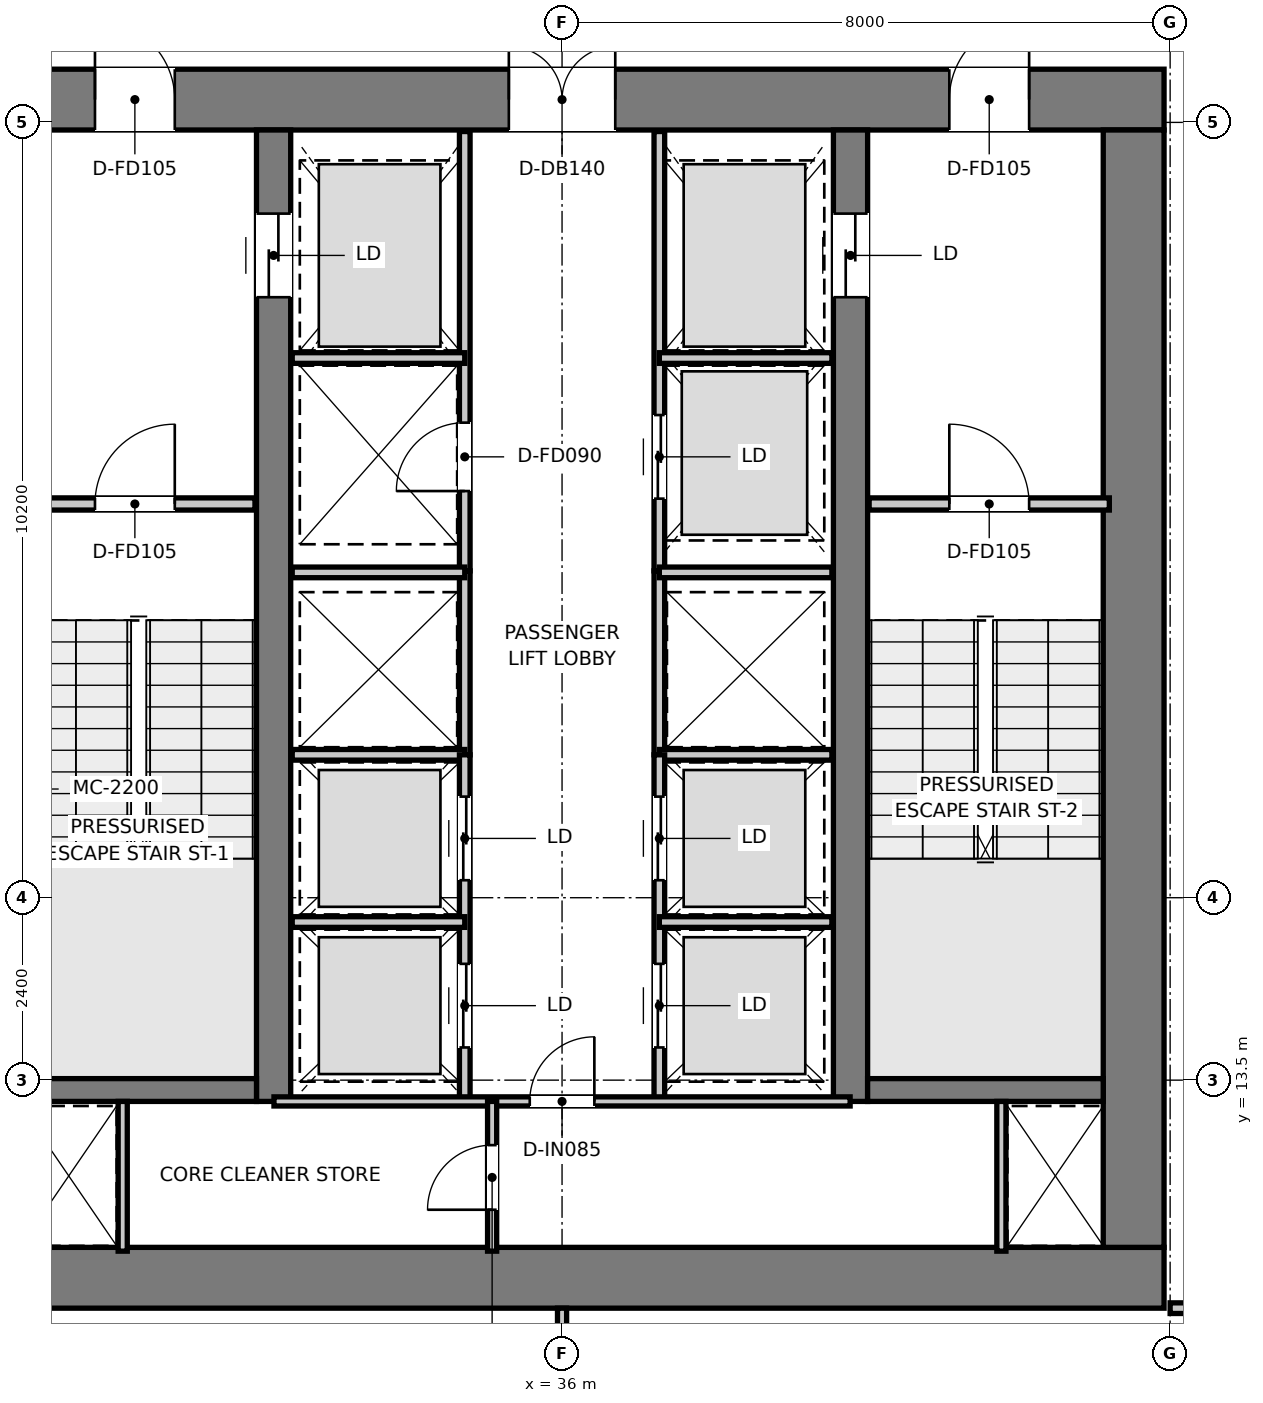
"""IFC4 building model, lengths in metres.
Left out: names, types, materials, properties, quantities, classifications, styles, units other than length and angle.
Written with IfcOpenShell. Run it as: python <this file> out.ifc"""

import sys

from ifc_helpers import new_model, si_unit, direction, frame, frame_2d, origin, place, context, subcontext, project, spatial, rectangle, extrude, element, fill, save


model = new_model("IFC4")
c1 = context("Model", 3, precision=1e-05, world=origin(), true_north=direction((0.0, 1.0)))
c2 = subcontext(c1, "Body", "Model", "MODEL_VIEW")
j1 = project(units=[si_unit("LENGTHUNIT", "METRE"), si_unit("PLANEANGLEUNIT", "RADIAN")], contexts=[c1])
p1 = place(None, origin())
s1 = spatial("IfcSite", under=j1, at=p1, CompositionType="ELEMENT")
p2 = place(p1, origin())
s2 = spatial("IfcBuilding", under=s1, at=p2, CompositionType="ELEMENT")
p3 = place(p2, frame((0.0, 0.0, 68.45)))
s3 = spatial("IfcBuildingStorey", under=s2, at=p3, CompositionType="ELEMENT", Elevation=68.45)
p4 = place(p3, frame((28.08, 10.9, 0.0), z_axis=(0.0, 0.0, 1.0), x_axis=(1.0, 0.0, 0.0)))
e1 = element("IfcWall", 1, at=p4, inside=s3, PredefinedType="SHEAR", context=c2, shape_type="SweptSolid", body=[
    extrude(rectangle(XDim=15.84, YDim=0.8, at=frame_2d((7.92, 0.0))), origin(), (0.0, 0.0, 1.0), 3.95),
])
p5 = place(p3, frame((28.08, 26.4, 0.0), z_axis=(0.0, 0.0, 1.0), x_axis=(1.0, 0.0, 0.0)))
e2 = element("IfcWall", 2, at=p5, inside=s3, PredefinedType="SHEAR", context=c2, shape_type="SweptSolid", body=[
    extrude(rectangle(XDim=15.84, YDim=0.8, at=frame_2d((7.92, 0.0))), origin(), (0.0, 0.0, 1.0), 3.95),
])
p6 = place(p5, frame((7.22, 0.0, 0.0)))
e3 = element("IfcOpeningElement", 3, at=p6, cuts=e2, PredefinedType="OPENING", context=c2, shape_type="SweptSolid", body=[
    extrude(rectangle(XDim=1.4, YDim=2.2, at=frame_2d((0.7, 1.1))), frame((0.0, 0.41, 0.0), z_axis=(0.0, -1.0, 0.0), x_axis=(1.0, 0.0, 0.0)), (0.0, 0.0, 1.0), 0.82),
])
p7 = place(p5, frame((1.775, 0.0, 0.0)))
e4 = element("IfcOpeningElement", 4, at=p7, cuts=e2, PredefinedType="OPENING", context=c2, shape_type="SweptSolid", body=[
    extrude(rectangle(XDim=1.05, YDim=2.1, at=frame_2d((0.525, 1.05))), frame((0.0, 0.41, 0.0), z_axis=(0.0, -1.0, 0.0), x_axis=(1.0, 0.0, 0.0)), (0.0, 0.0, 1.0), 0.82),
])
p8 = place(p5, frame((13.015, 0.0, 0.0)))
e5 = element("IfcOpeningElement", 5, at=p8, cuts=e2, PredefinedType="OPENING", context=c2, shape_type="SweptSolid", body=[
    extrude(rectangle(XDim=1.05, YDim=2.1, at=frame_2d((0.525, 1.05))), frame((0.0, 0.41, 0.0), z_axis=(0.0, -1.0, 0.0), x_axis=(1.0, 0.0, 0.0)), (0.0, 0.0, 1.0), 0.82),
])
p9 = place(p3, frame((43.52, 11.3, 0.0), z_axis=(0.0, 0.0, 1.0), x_axis=(0.0, 1.0, 0.0)))
e6 = element("IfcWall", 6, at=p9, inside=s3, PredefinedType="SHEAR", context=c2, shape_type="SweptSolid", body=[
    extrude(rectangle(XDim=14.7, YDim=0.8, at=frame_2d((7.35, 0.0))), origin(), (0.0, 0.0, 1.0), 3.95),
])
p10 = place(p3, frame((32.205, 13.22, 0.0), z_axis=(0.0, 0.0, 1.0), x_axis=(0.0, 1.0, 0.0)))
e7 = element("IfcWall", 7, at=p10, inside=s3, PredefinedType="SHEAR", context=c2, shape_type="SweptSolid", body=[
    extrude(rectangle(XDim=12.78, YDim=0.45, at=frame_2d((6.39, 0.0))), origin(), (0.0, 0.0, 1.0), 3.95),
])
p11 = place(p10, frame((10.58, 0.0, 0.0)))
e8 = element("IfcOpeningElement", 8, at=p11, cuts=e7, PredefinedType="OPENING", context=c2, shape_type="SweptSolid", body=[
    extrude(rectangle(XDim=1.1, YDim=2.15, at=frame_2d((0.55, 1.075))), frame((0.0, 0.235, 0.0), z_axis=(0.0, -1.0, 0.0), x_axis=(1.0, 0.0, 0.0)), (0.0, 0.0, 1.0), 0.47),
])
p12 = place(p3, frame((39.795, 13.22, 0.0), z_axis=(0.0, 0.0, 1.0), x_axis=(0.0, 1.0, 0.0)))
e9 = element("IfcWall", 9, at=p12, inside=s3, PredefinedType="SHEAR", context=c2, shape_type="SweptSolid", body=[
    extrude(rectangle(XDim=12.78, YDim=0.45, at=frame_2d((6.39, 0.0))), origin(), (0.0, 0.0, 1.0), 3.95),
])
p13 = place(p12, frame((10.58, 0.0, 0.0)))
e10 = element("IfcOpeningElement", 10, at=p13, cuts=e9, PredefinedType="OPENING", context=c2, shape_type="SweptSolid", body=[
    extrude(rectangle(XDim=1.1, YDim=2.15, at=frame_2d((0.55, 1.075))), frame((0.0, 0.235, 0.0), z_axis=(0.0, -1.0, 0.0), x_axis=(1.0, 0.0, 0.0)), (0.0, 0.0, 1.0), 0.47),
])
for number, where, z_axis, x_axis in (
    (11, (28.88, 13.37, 0.0), (0.0, 0.0, 1.0), (1.0, 0.0, 0.0)),
    (12, (40.02, 13.37, 0.0), (0.0, 0.0, 1.0), (1.0, 0.0, 0.0)),
):
    element("IfcWall", number, at=place(p3, frame(where, z_axis=z_axis, x_axis=x_axis)), inside=s3, PredefinedType="SHEAR", context=c2, shape_type="SweptSolid", body=[
        extrude(rectangle(XDim=3.1, YDim=0.3, at=frame_2d((1.55, 0.0))), origin(), (0.0, 0.0, 1.0), 3.95),
    ])
p14 = place(p3, frame((28.8, 21.08, 0.0), z_axis=(0.0, 0.0, 1.0), x_axis=(1.0, 0.0, 0.0)))
e13 = element("IfcWall", 13, at=p14, inside=s3, PredefinedType="PARTITIONING", context=c2, shape_type="SweptSolid", body=[
    extrude(rectangle(XDim=3.16, YDim=0.16, at=frame_2d((1.58, 0.0))), origin(), (0.0, 0.0, 1.0), 3.67),
])
p15 = place(p14, frame((1.055, 0.0, 0.0)))
e14 = element("IfcOpeningElement", 14, at=p15, cuts=e13, PredefinedType="OPENING", context=c2, shape_type="SweptSolid", body=[
    extrude(rectangle(XDim=1.05, YDim=2.1, at=frame_2d((0.525, 1.05))), frame((0.0, 0.09, 0.0), z_axis=(0.0, -1.0, 0.0), x_axis=(1.0, 0.0, 0.0)), (0.0, 0.0, 1.0), 0.18),
])
p16 = place(p3, frame((40.04, 21.08, 0.0), z_axis=(0.0, 0.0, 1.0), x_axis=(1.0, 0.0, 0.0)))
e15 = element("IfcWall", 15, at=p16, inside=s3, PredefinedType="PARTITIONING", context=c2, shape_type="SweptSolid", body=[
    extrude(rectangle(XDim=3.16, YDim=0.16, at=frame_2d((1.58, 0.0))), origin(), (0.0, 0.0, 1.0), 3.67),
])
p17 = place(p16, frame((1.055, 0.0, 0.0)))
e16 = element("IfcOpeningElement", 16, at=p17, cuts=e15, PredefinedType="OPENING", context=c2, shape_type="SweptSolid", body=[
    extrude(rectangle(XDim=1.05, YDim=2.1, at=frame_2d((0.525, 1.05))), frame((0.0, 0.09, 0.0), z_axis=(0.0, -1.0, 0.0), x_axis=(1.0, 0.0, 0.0)), (0.0, 0.0, 1.0), 0.18),
])
p18 = place(p3, frame((34.72, 20.2, 0.0), z_axis=(0.0, 0.0, 1.0), x_axis=(0.0, 1.0, 0.0)))
e17 = element("IfcWall", 17, at=p18, inside=s3, PredefinedType="PARTITIONING", context=c2, shape_type="SweptSolid", body=[
    extrude(rectangle(XDim=5.78, YDim=0.14, at=frame_2d((2.89, 0.0))), origin(), (0.0, 0.0, 1.0), 2.47),
])
p19 = place(p18, frame((1.05, 0.0, 0.0)))
e18 = element("IfcOpeningElement", 18, at=p19, cuts=e17, PredefinedType="OPENING", context=c2, shape_type="SweptSolid", body=[
    extrude(rectangle(XDim=0.9, YDim=2.1, at=frame_2d((0.45, 1.05))), frame((0.0, 0.08, 0.0), z_axis=(0.0, -1.0, 0.0), x_axis=(1.0, 0.0, 0.0)), (0.0, 0.0, 1.0), 0.16),
])
p20 = place(p3, frame((37.28, 20.2, 0.0), z_axis=(0.0, 0.0, 1.0), x_axis=(0.0, 1.0, 0.0)))
e19 = element("IfcWall", 19, at=p20, inside=s3, PredefinedType="PARTITIONING", context=c2, shape_type="SweptSolid", body=[
    extrude(rectangle(XDim=5.78, YDim=0.14, at=frame_2d((2.89, 0.0))), origin(), (0.0, 0.0, 1.0), 2.47),
])
p21 = place(p20, frame((0.95, 0.0, 0.0)))
e20 = element("IfcOpeningElement", 20, at=p21, cuts=e19, PredefinedType="OPENING", context=c2, shape_type="SweptSolid", body=[
    extrude(rectangle(XDim=1.1, YDim=2.15, at=frame_2d((0.55, 1.075))), frame((0.0, 0.08, 0.0), z_axis=(0.0, -1.0, 0.0), x_axis=(1.0, 0.0, 0.0)), (0.0, 0.0, 1.0), 0.16),
])
for number, where, z_axis, x_axis in (
    (21, (32.45, 23.0, 0.0), (0.0, 0.0, 1.0), (1.0, 0.0, 0.0)),
    (22, (37.28, 23.0, 0.0), (0.0, 0.0, 1.0), (1.0, 0.0, 0.0)),
):
    element("IfcWall", number, at=place(p3, frame(where, z_axis=z_axis, x_axis=x_axis)), inside=s3, PredefinedType="PARTITIONING", context=c2, shape_type="SweptSolid", body=[
        extrude(rectangle(XDim=2.27, YDim=0.14, at=frame_2d((1.135, 0.0))), origin(), (0.0, 0.0, 1.0), 2.47),
    ])
for number, where, z_axis, x_axis in (
    (23, (34.72, 17.78, 0.0), (0.0, 0.0, 1.0), (0.0, 1.0, 0.0)),
    (24, (37.28, 17.78, 0.0), (0.0, 0.0, 1.0), (0.0, 1.0, 0.0)),
):
    element("IfcWall", number, at=place(p3, frame(where, z_axis=z_axis, x_axis=x_axis)), inside=s3, PredefinedType="PARTITIONING", context=c2, shape_type="SweptSolid", body=[
        extrude(rectangle(XDim=2.42, YDim=0.14, at=frame_2d((1.21, 0.0))), origin(), (0.0, 0.0, 1.0), 3.67),
    ])
for number, where, z_axis, x_axis in (
    (25, (32.45, 17.78, 0.0), (0.0, 0.0, 1.0), (1.0, 0.0, 0.0)),
    (26, (32.45, 20.18, 0.0), (0.0, 0.0, 1.0), (1.0, 0.0, 0.0)),
    (27, (37.28, 17.78, 0.0), (0.0, 0.0, 1.0), (1.0, 0.0, 0.0)),
    (28, (37.28, 20.18, 0.0), (0.0, 0.0, 1.0), (1.0, 0.0, 0.0)),
):
    element("IfcWall", number, at=place(p3, frame(where, z_axis=z_axis, x_axis=x_axis)), inside=s3, PredefinedType="PARTITIONING", context=c2, shape_type="SweptSolid", body=[
        extrude(rectangle(XDim=2.27, YDim=0.14, at=frame_2d((1.135, 0.0))), origin(), (0.0, 0.0, 1.0), 3.67),
    ])
p22 = place(p3, frame((34.72, 13.22, 0.0), z_axis=(0.0, 0.0, 1.0), x_axis=(0.0, 1.0, 0.0)))
e29 = element("IfcWall", 29, at=p22, inside=s3, PredefinedType="PARTITIONING", context=c2, shape_type="SweptSolid", body=[
    extrude(rectangle(XDim=4.56, YDim=0.14, at=frame_2d((2.28, 0.0))), origin(), (0.0, 0.0, 1.0), 3.67),
])
p23 = place(p22, frame((0.71, 0.0, 0.0)))
e30 = element("IfcOpeningElement", 30, at=p23, cuts=e29, PredefinedType="OPENING", context=c2, shape_type="SweptSolid", body=[
    extrude(rectangle(XDim=1.1, YDim=2.15, at=frame_2d((0.55, 1.075))), frame((0.0, 0.08, 0.0), z_axis=(0.0, -1.0, 0.0), x_axis=(1.0, 0.0, 0.0)), (0.0, 0.0, 1.0), 0.16),
])
p24 = place(p22, frame((2.91, 0.0, 0.0)))
e31 = element("IfcOpeningElement", 31, at=p24, cuts=e29, PredefinedType="OPENING", context=c2, shape_type="SweptSolid", body=[
    extrude(rectangle(XDim=1.1, YDim=2.15, at=frame_2d((0.55, 1.075))), frame((0.0, 0.08, 0.0), z_axis=(0.0, -1.0, 0.0), x_axis=(1.0, 0.0, 0.0)), (0.0, 0.0, 1.0), 0.16),
])
p25 = place(p3, frame((32.45, 15.58, 0.0), z_axis=(0.0, 0.0, 1.0), x_axis=(1.0, 0.0, 0.0)))
e32 = element("IfcWall", 32, at=p25, inside=s3, PredefinedType="PARTITIONING", context=c2, shape_type="SweptSolid", body=[
    extrude(rectangle(XDim=2.27, YDim=0.14, at=frame_2d((1.135, 0.0))), origin(), (0.0, 0.0, 1.0), 3.67),
])
p26 = place(p3, frame((37.28, 13.22, 0.0), z_axis=(0.0, 0.0, 1.0), x_axis=(0.0, 1.0, 0.0)))
e33 = element("IfcWall", 33, at=p26, inside=s3, PredefinedType="PARTITIONING", context=c2, shape_type="SweptSolid", body=[
    extrude(rectangle(XDim=4.56, YDim=0.14, at=frame_2d((2.28, 0.0))), origin(), (0.0, 0.0, 1.0), 3.67),
])
p27 = place(p26, frame((0.71, 0.0, 0.0)))
e34 = element("IfcOpeningElement", 34, at=p27, cuts=e33, PredefinedType="OPENING", context=c2, shape_type="SweptSolid", body=[
    extrude(rectangle(XDim=1.1, YDim=2.15, at=frame_2d((0.55, 1.075))), frame((0.0, 0.08, 0.0), z_axis=(0.0, -1.0, 0.0), x_axis=(1.0, 0.0, 0.0)), (0.0, 0.0, 1.0), 0.16),
])
p28 = place(p26, frame((2.91, 0.0, 0.0)))
e35 = element("IfcOpeningElement", 35, at=p28, cuts=e33, PredefinedType="OPENING", context=c2, shape_type="SweptSolid", body=[
    extrude(rectangle(XDim=1.1, YDim=2.15, at=frame_2d((0.55, 1.075))), frame((0.0, 0.08, 0.0), z_axis=(0.0, -1.0, 0.0), x_axis=(1.0, 0.0, 0.0)), (0.0, 0.0, 1.0), 0.16),
])
p29 = place(p3, frame((37.28, 15.58, 0.0), z_axis=(0.0, 0.0, 1.0), x_axis=(1.0, 0.0, 0.0)))
e36 = element("IfcWall", 36, at=p29, inside=s3, PredefinedType="PARTITIONING", context=c2, shape_type="SweptSolid", body=[
    extrude(rectangle(XDim=2.27, YDim=0.14, at=frame_2d((1.135, 0.0))), origin(), (0.0, 0.0, 1.0), 3.67),
])
for number, where, z_axis, x_axis in (
    (37, (30.22, 11.25, 0.0), (0.0, 0.0, 1.0), (0.0, 1.0, 0.0)),
    (38, (41.78, 11.25, 0.0), (0.0, 0.0, 1.0), (0.0, 1.0, 0.0)),
):
    element("IfcWall", number, at=place(p3, frame(where, z_axis=z_axis, x_axis=x_axis)), inside=s3, PredefinedType="PARTITIONING", context=c2, shape_type="SweptSolid", body=[
        extrude(rectangle(XDim=1.97, YDim=0.12, at=frame_2d((0.985, 0.0))), origin(), (0.0, 0.0, 1.0), 3.67),
    ])
p30 = place(p3, frame((32.21, 13.22, 0.0), z_axis=(0.0, 0.0, 1.0), x_axis=(1.0, 0.0, 0.0)))
e39 = element("IfcWall", 39, at=p30, inside=s3, PredefinedType="PARTITIONING", context=c2, shape_type="SweptSolid", body=[
    extrude(rectangle(XDim=7.58, YDim=0.12, at=frame_2d((3.79, 0.0))), origin(), (0.0, 0.0, 1.0), 3.67),
])
p31 = place(p30, frame((3.365, 0.0, 0.0)))
e40 = element("IfcOpeningElement", 40, at=p31, cuts=e39, PredefinedType="OPENING", context=c2, shape_type="SweptSolid", body=[
    extrude(rectangle(XDim=0.85, YDim=2.1, at=frame_2d((0.425, 1.05))), frame((0.0, 0.07, 0.0), z_axis=(0.0, -1.0, 0.0), x_axis=(1.0, 0.0, 0.0)), (0.0, 0.0, 1.0), 0.14),
])
p32 = place(p3, frame((35.08, 11.25, 0.0), z_axis=(0.0, 0.0, 1.0), x_axis=(0.0, 1.0, 0.0)))
e41 = element("IfcWall", 41, at=p32, inside=s3, PredefinedType="PARTITIONING", context=c2, shape_type="SweptSolid", body=[
    extrude(rectangle(XDim=1.97, YDim=0.12, at=frame_2d((0.985, 0.0))), origin(), (0.0, 0.0, 1.0), 3.67),
])
p33 = place(p32, frame((0.545, 0.0, 0.0)))
e42 = element("IfcOpeningElement", 42, at=p33, cuts=e41, PredefinedType="OPENING", context=c2, shape_type="SweptSolid", body=[
    extrude(rectangle(XDim=0.85, YDim=2.1, at=frame_2d((0.425, 1.05))), frame((0.0, 0.07, 0.0), z_axis=(0.0, -1.0, 0.0), x_axis=(1.0, 0.0, 0.0)), (0.0, 0.0, 1.0), 0.14),
])
p34 = place(p3, frame((44.0, 10.5, 0.0), z_axis=(0.0, 0.0, 1.0), x_axis=(1.0, 0.0, 0.0)))
e43 = element("IfcWall", 43, at=p34, inside=s3, PredefinedType="PARTITIONING", context=c2, shape_type="SweptSolid", body=[
    extrude(rectangle(XDim=1.68, YDim=0.14, at=frame_2d((0.84, 0.0))), origin(), (0.0, 0.0, 1.0), 3.67),
])
p35 = place(p34, frame((0.385, 0.0, 0.0)))
e44 = element("IfcOpeningElement", 44, at=p35, cuts=e43, PredefinedType="OPENING", context=c2, shape_type="SweptSolid", body=[
    extrude(rectangle(XDim=0.85, YDim=2.1, at=frame_2d((0.425, 1.05))), frame((0.0, 0.08, 0.0), z_axis=(0.0, -1.0, 0.0), x_axis=(1.0, 0.0, 0.0)), (0.0, 0.0, 1.0), 0.16),
])
p36 = place(p3, frame((36.0, 1.513, 0.0), z_axis=(0.0, 0.0, 1.0), x_axis=(0.0, 1.0, 0.0)))
e45 = element("IfcWall", 45, at=p36, inside=s3, PredefinedType="PARTITIONING", context=c2, shape_type="SweptSolid", body=[
    extrude(rectangle(XDim=8.987, YDim=0.12, at=frame_2d((4.493, 0.0))), origin(), (0.0, 0.0, 1.0), 3.67),
])
p37 = place(p15, origin())
e46 = element("IfcDoor", 46, at=p37, inside=s3, OperationType="SINGLE_SWING_RIGHT", PredefinedType="DOOR", context=c2, shape_type="SweptSolid", body=[
    extrude(rectangle(XDim=1.05, YDim=2.1, at=frame_2d((0.525, 1.05))), frame((0.0, 0.025, 0.0), z_axis=(0.0, -1.0, 0.0), x_axis=(1.0, 0.0, 0.0)), (0.0, 0.0, 1.0), 0.05),
])
fill(e14, e46)
p38 = place(p17, origin())
e47 = element("IfcDoor", 47, at=p38, inside=s3, OperationType="SINGLE_SWING_LEFT", PredefinedType="DOOR", context=c2, shape_type="SweptSolid", body=[
    extrude(rectangle(XDim=1.05, YDim=2.1, at=frame_2d((0.525, 1.05))), frame((0.0, 0.025, 0.0), z_axis=(0.0, -1.0, 0.0), x_axis=(1.0, 0.0, 0.0)), (0.0, 0.0, 1.0), 0.05),
])
fill(e16, e47)
p39 = place(p6, origin())
e48 = element("IfcDoor", 48, at=p39, inside=s3, OperationType="DOUBLE_DOOR_SINGLE_SWING", PredefinedType="DOOR", context=c2, shape_type="SweptSolid", body=[
    extrude(rectangle(XDim=1.4, YDim=2.2, at=frame_2d((0.7, 1.1))), frame((0.0, 0.025, 0.0), z_axis=(0.0, -1.0, 0.0), x_axis=(1.0, 0.0, 0.0)), (0.0, 0.0, 1.0), 0.05),
])
fill(e3, e48)
p40 = place(p7, origin())
e49 = element("IfcDoor", 49, at=p40, inside=s3, OperationType="SINGLE_SWING_LEFT", PredefinedType="DOOR", context=c2, shape_type="SweptSolid", body=[
    extrude(rectangle(XDim=1.05, YDim=2.1, at=frame_2d((0.525, 1.05))), frame((0.0, 0.025, 0.0), z_axis=(0.0, -1.0, 0.0), x_axis=(1.0, 0.0, 0.0)), (0.0, 0.0, 1.0), 0.05),
])
fill(e4, e49)
p41 = place(p8, origin())
e50 = element("IfcDoor", 50, at=p41, inside=s3, OperationType="SINGLE_SWING_RIGHT", PredefinedType="DOOR", context=c2, shape_type="SweptSolid", body=[
    extrude(rectangle(XDim=1.05, YDim=2.1, at=frame_2d((0.525, 1.05))), frame((0.0, 0.025, 0.0), z_axis=(0.0, -1.0, 0.0), x_axis=(1.0, 0.0, 0.0)), (0.0, 0.0, 1.0), 0.05),
])
fill(e5, e50)
p42 = place(p11, origin())
e51 = element("IfcDoor", 51, at=p42, inside=s3, OperationType="DOUBLE_DOOR_SLIDING", PredefinedType="DOOR", context=c2, shape_type="SweptSolid", body=[
    extrude(rectangle(XDim=1.1, YDim=2.15, at=frame_2d((0.55, 1.075))), frame((0.0, 0.025, 0.0), z_axis=(0.0, -1.0, 0.0), x_axis=(1.0, 0.0, 0.0)), (0.0, 0.0, 1.0), 0.05),
])
fill(e8, e51)
p43 = place(p13, origin())
e52 = element("IfcDoor", 52, at=p43, inside=s3, OperationType="DOUBLE_DOOR_SLIDING", PredefinedType="DOOR", context=c2, shape_type="SweptSolid", body=[
    extrude(rectangle(XDim=1.1, YDim=2.15, at=frame_2d((0.55, 1.075))), frame((0.0, 0.025, 0.0), z_axis=(0.0, -1.0, 0.0), x_axis=(1.0, 0.0, 0.0)), (0.0, 0.0, 1.0), 0.05),
])
fill(e10, e52)
p44 = place(p19, origin())
e53 = element("IfcDoor", 53, at=p44, inside=s3, OperationType="SINGLE_SWING_LEFT", PredefinedType="DOOR", context=c2, shape_type="SweptSolid", body=[
    extrude(rectangle(XDim=0.9, YDim=2.1, at=frame_2d((0.45, 1.05))), frame((0.0, 0.025, 0.0), z_axis=(0.0, -1.0, 0.0), x_axis=(1.0, 0.0, 0.0)), (0.0, 0.0, 1.0), 0.05),
])
fill(e18, e53)
p45 = place(p21, origin())
e54 = element("IfcDoor", 54, at=p45, inside=s3, OperationType="DOUBLE_DOOR_SLIDING", PredefinedType="DOOR", context=c2, shape_type="SweptSolid", body=[
    extrude(rectangle(XDim=1.1, YDim=2.15, at=frame_2d((0.55, 1.075))), frame((0.0, 0.025, 0.0), z_axis=(0.0, -1.0, 0.0), x_axis=(1.0, 0.0, 0.0)), (0.0, 0.0, 1.0), 0.05),
])
fill(e20, e54)
p46 = place(p23, origin())
e55 = element("IfcDoor", 55, at=p46, inside=s3, OperationType="DOUBLE_DOOR_SLIDING", PredefinedType="DOOR", context=c2, shape_type="SweptSolid", body=[
    extrude(rectangle(XDim=1.1, YDim=2.15, at=frame_2d((0.55, 1.075))), frame((0.0, 0.025, 0.0), z_axis=(0.0, -1.0, 0.0), x_axis=(1.0, 0.0, 0.0)), (0.0, 0.0, 1.0), 0.05),
])
fill(e30, e55)
p47 = place(p24, origin())
e56 = element("IfcDoor", 56, at=p47, inside=s3, OperationType="DOUBLE_DOOR_SLIDING", PredefinedType="DOOR", context=c2, shape_type="SweptSolid", body=[
    extrude(rectangle(XDim=1.1, YDim=2.15, at=frame_2d((0.55, 1.075))), frame((0.0, 0.025, 0.0), z_axis=(0.0, -1.0, 0.0), x_axis=(1.0, 0.0, 0.0)), (0.0, 0.0, 1.0), 0.05),
])
fill(e31, e56)
p48 = place(p27, origin())
e57 = element("IfcDoor", 57, at=p48, inside=s3, OperationType="DOUBLE_DOOR_SLIDING", PredefinedType="DOOR", context=c2, shape_type="SweptSolid", body=[
    extrude(rectangle(XDim=1.1, YDim=2.15, at=frame_2d((0.55, 1.075))), frame((0.0, 0.025, 0.0), z_axis=(0.0, -1.0, 0.0), x_axis=(1.0, 0.0, 0.0)), (0.0, 0.0, 1.0), 0.05),
])
fill(e34, e57)
p49 = place(p28, origin())
e58 = element("IfcDoor", 58, at=p49, inside=s3, OperationType="DOUBLE_DOOR_SLIDING", PredefinedType="DOOR", context=c2, shape_type="SweptSolid", body=[
    extrude(rectangle(XDim=1.1, YDim=2.15, at=frame_2d((0.55, 1.075))), frame((0.0, 0.025, 0.0), z_axis=(0.0, -1.0, 0.0), x_axis=(1.0, 0.0, 0.0)), (0.0, 0.0, 1.0), 0.05),
])
fill(e35, e58)
p50 = place(p31, origin())
e59 = element("IfcDoor", 59, at=p50, inside=s3, OperationType="SINGLE_SWING_RIGHT", PredefinedType="DOOR", context=c2, shape_type="SweptSolid", body=[
    extrude(rectangle(XDim=0.85, YDim=2.1, at=frame_2d((0.425, 1.05))), frame((0.0, 0.025, 0.0), z_axis=(0.0, -1.0, 0.0), x_axis=(1.0, 0.0, 0.0)), (0.0, 0.0, 1.0), 0.05),
])
fill(e40, e59)
p51 = place(p33, origin())
e60 = element("IfcDoor", 60, at=p51, inside=s3, OperationType="SINGLE_SWING_LEFT", PredefinedType="DOOR", context=c2, shape_type="SweptSolid", body=[
    extrude(rectangle(XDim=0.85, YDim=2.1, at=frame_2d((0.425, 1.05))), frame((0.0, 0.025, 0.0), z_axis=(0.0, -1.0, 0.0), x_axis=(1.0, 0.0, 0.0)), (0.0, 0.0, 1.0), 0.05),
])
fill(e42, e60)
save(model, sys.argv[1])
